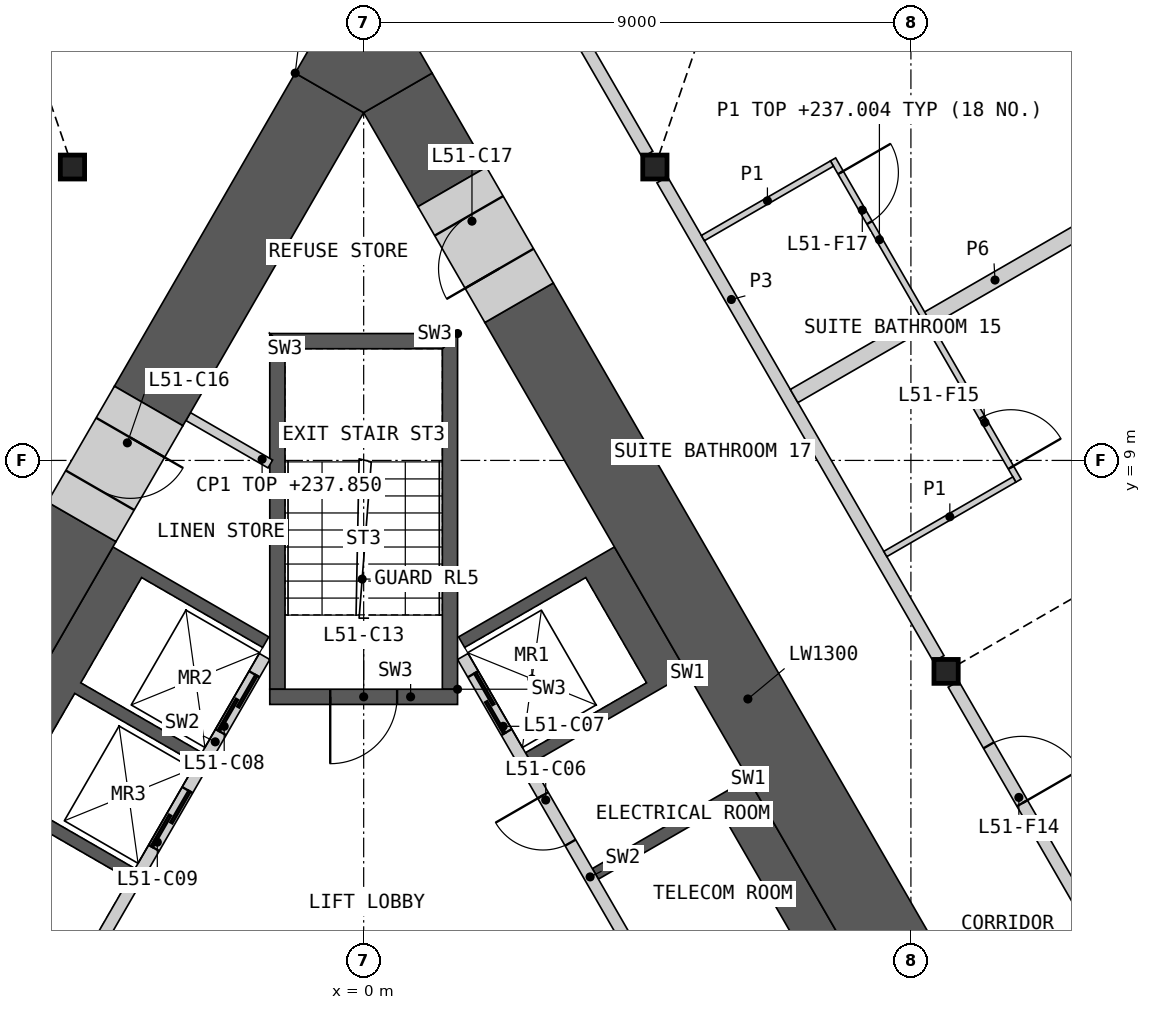
"""IFC4 building model, lengths in metres.
Left out: names, types, materials, properties, quantities, classifications, styles, units other than length and angle.
Written with IfcOpenShell. Run it as: python <this file> out.ifc"""

import sys

from ifc_helpers import new_model, si_unit, direction, frame, frame_2d, origin, origin_2d, place, context, subcontext, project, spatial, polyline, rectangle, i_section, outline, extrude, element, fill, save


model = new_model("IFC4")
c1 = context("Model", 3, precision=1e-05, world=origin(), true_north=direction((0.0, 1.0)))
c2 = subcontext(c1, "Body", "Model", "MODEL_VIEW")
j1 = project(units=[si_unit("LENGTHUNIT", "METRE"), si_unit("PLANEANGLEUNIT", "RADIAN")], contexts=[c1])
p1 = place(None, origin())
s1 = spatial("IfcSite", under=j1, at=p1, CompositionType="ELEMENT")
p2 = place(p1, origin())
s2 = spatial("IfcBuilding", under=s1, at=p2, CompositionType="ELEMENT")
p3 = place(p2, frame((0.0, 0.0, 234.6)))
s3 = spatial("IfcBuildingStorey", under=s2, at=p3, CompositionType="ELEMENT", Elevation=234.6)
for number, where, z_axis, x_axis in (
    (1, (-4.789, 13.825, 0.0), (0.0, 0.0, 1.0), (1.0, 0.0, 0.0)),
    (2, (9.578, 5.53, 0.0), (0.0, 0.0, 1.0), (1.0, 0.0, 0.0)),
    (3, (4.789, 13.825, 0.0), (0.0, 0.0, 1.0), (1.0, 0.0, 0.0)),
):
    element("IfcColumn", number, at=place(p3, frame(where, z_axis=z_axis, x_axis=x_axis)), inside=s3, PredefinedType="COLUMN", context=c2, shape_type="SweptSolid", body=[
        extrude(i_section(OverallWidth=0.399, OverallDepth=0.393, WebThickness=0.023, FlangeThickness=0.037, at=origin_2d()), origin(), (0.0, 0.0, 1.0), 3.6),
    ])
p4 = place(p3, origin())
e4 = element("IfcWall", 4, at=p4, inside=s3, PredefinedType="SHEAR", context=c2, shape_type="SweptSolid", body=[
    extrude(outline(polyline([(6.324, 3.767), (8.624, -0.217), (8.231, -0.444), (6.061, -1.697), (5.96, -1.524), (7.952, -0.374), (5.852, 3.263), (3.861, 2.113), (3.76, 2.287), (5.931, 3.54), (6.324, 3.767)])), origin(), (0.0, 0.0, 1.0), 3.25),
])
p5 = place(p3, origin())
e5 = element("IfcWall", 5, at=p5, inside=s3, PredefinedType="SHEAR", context=c2, shape_type="SweptSolid", body=[
    extrude(outline(polyline([(5.324, 5.499), (4.931, 5.272), (2.76, 4.019), (2.66, 4.192), (4.652, 5.342), (3.652, 7.074), (1.66, 5.924), (1.561, 6.097), (3.731, 7.35), (4.124, 7.577), (5.324, 5.499)])), origin(), (0.0, 0.0, 1.0), 3.25),
])
p6 = place(p3, frame((5.817, -1.476, 0.0), z_axis=(0.0, 0.0, 1.0), x_axis=(-0.500002616675, 0.866023893041, 0.0)))
e6 = element("IfcWall", 6, at=p6, inside=s3, PredefinedType="SOLIDWALL", context=c2, shape_type="SweptSolid", body=[
    extrude(rectangle(XDim=8.373, YDim=0.2, at=frame_2d((4.187, 0.0))), origin(), (0.0, 0.0, 1.0), 3.25),
])
p7 = place(p6, frame((1.537, 0.0, 0.0)))
e7 = element("IfcOpeningElement", 7, at=p7, cuts=e6, PredefinedType="OPENING", context=c2, shape_type="SweptSolid", body=[
    extrude(rectangle(XDim=0.9, YDim=2.1, at=frame_2d((0.45, 1.05))), frame((0.0, 0.11, 0.0), z_axis=(0.0, -1.0, 0.0), x_axis=(1.0, 0.0, 0.0)), (0.0, 0.0, 1.0), 0.22),
])
p8 = place(p6, frame((4.837, 0.0, 0.0)))
e8 = element("IfcOpeningElement", 8, at=p8, cuts=e6, PredefinedType="OPENING", context=c2, shape_type="SweptSolid", body=[
    extrude(rectangle(XDim=0.9, YDim=2.1, at=frame_2d((0.45, 1.05))), frame((0.0, 0.11, 0.0), z_axis=(0.0, -1.0, 0.0), x_axis=(1.0, 0.0, 0.0)), (0.0, 0.0, 1.0), 0.22),
])
p9 = place(p6, frame((6.937, 0.0, 0.0)))
e9 = element("IfcOpeningElement", 9, at=p9, cuts=e6, PredefinedType="OPENING", context=c2, shape_type="SweptSolid", body=[
    extrude(rectangle(XDim=1.1, YDim=2.1, at=frame_2d((0.55, 1.05))), frame((0.0, 0.11, 0.0), z_axis=(0.0, -1.0, 0.0), x_axis=(1.0, 0.0, 0.0)), (0.0, 0.0, 1.0), 0.22),
])
p10 = place(p3, origin())
e10 = element("IfcWall", 10, at=p10, inside=s3, PredefinedType="SHEAR", context=c2, shape_type="SweptSolid", body=[
    extrude(outline(polyline([(-7.524, 1.688), (-4.124, 7.577), (-3.731, 7.35), (-1.561, 6.097), (-1.66, 5.924), (-3.652, 7.074), (-4.652, 5.342), (-2.66, 4.192), (-2.76, 4.019), (-4.752, 5.169), (-5.752, 3.437), (-3.76, 2.287), (-3.861, 2.113), (-5.852, 3.263), (-6.852, 1.531), (-4.861, 0.381), (-4.96, 0.208), (-7.131, 1.461), (-7.524, 1.688)])), origin(), (0.0, 0.0, 1.0), 3.25),
])
p11 = place(p3, frame((-1.631, 5.776, 0.0), z_axis=(0.0, 0.0, 1.0), x_axis=(-0.499992876559, -0.866029516466, 0.0)))
e11 = element("IfcWall", 11, at=p11, inside=s3, PredefinedType="SOLIDWALL", context=c2, shape_type="SweptSolid", body=[
    extrude(rectangle(XDim=6.486, YDim=0.2, at=frame_2d((3.243, 0.0))), origin(), (0.0, 0.0, 1.0), 3.25),
])
p12 = place(p11, frame((0.337, 0.0, 0.0)))
e12 = element("IfcOpeningElement", 12, at=p12, cuts=e11, PredefinedType="OPENING", context=c2, shape_type="SweptSolid", body=[
    extrude(rectangle(XDim=1.1, YDim=2.1, at=frame_2d((0.55, 1.05))), frame((0.0, 0.11, 0.0), z_axis=(0.0, -1.0, 0.0), x_axis=(1.0, 0.0, 0.0)), (0.0, 0.0, 1.0), 0.22),
])
p13 = place(p11, frame((2.537, 0.0, 0.0)))
e13 = element("IfcOpeningElement", 13, at=p13, cuts=e11, PredefinedType="OPENING", context=c2, shape_type="SweptSolid", body=[
    extrude(rectangle(XDim=1.1, YDim=2.1, at=frame_2d((0.55, 1.05))), frame((0.0, 0.11, 0.0), z_axis=(0.0, -1.0, 0.0), x_axis=(1.0, 0.0, 0.0)), (0.0, 0.0, 1.0), 0.22),
])
p14 = place(p3, origin())
e14 = element("IfcWall", 14, at=p14, inside=s3, PredefinedType="SHEAR", context=c2, shape_type="SweptSolid", body=[
    extrude(outline(polyline([(1.544, 5.237), (1.544, 11.087), (1.294, 10.837), (1.294, 5.237), (1.544, 5.237)])), origin(), (0.0, 0.0, 1.0), 3.25),
])
p15 = place(p3, origin())
e15 = element("IfcWall", 15, at=p15, inside=s3, PredefinedType="SHEAR", context=c2, shape_type="SweptSolid", body=[
    extrude(outline(polyline([(1.544, 11.087), (-1.544, 11.087), (-1.294, 10.837), (1.294, 10.837), (1.544, 11.087)])), origin(), (0.0, 0.0, 1.0), 3.25),
])
p16 = place(p3, origin())
e16 = element("IfcWall", 16, at=p16, inside=s3, PredefinedType="SHEAR", context=c2, shape_type="SweptSolid", body=[
    extrude(outline(polyline([(-1.294, 10.837), (-1.544, 11.087), (-1.544, 5.237), (-1.294, 5.237), (-1.294, 10.837)])), origin(), (0.0, 0.0, 1.0), 3.25),
])
p17 = place(p3, frame((1.544, 5.112, 0.0), z_axis=(0.0, 0.0, 1.0), x_axis=(-1.0, 0.0, 0.0)))
e17 = element("IfcWall", 17, at=p17, inside=s3, PredefinedType="SHEAR", context=c2, shape_type="SweptSolid", body=[
    extrude(rectangle(XDim=3.088, YDim=0.25, at=frame_2d((1.544, 0.0))), origin(), (0.0, 0.0, 1.0), 3.25),
])
p18 = place(p17, frame((0.994, 0.0, 0.0)))
e18 = element("IfcOpeningElement", 18, at=p18, cuts=e17, PredefinedType="OPENING", context=c2, shape_type="SweptSolid", body=[
    extrude(rectangle(XDim=1.1, YDim=2.1, at=frame_2d((0.55, 1.05))), frame((0.0, 0.135, 0.0), z_axis=(0.0, -1.0, 0.0), x_axis=(1.0, 0.0, 0.0)), (0.0, 0.0, 1.0), 0.27),
])
p19 = place(p3, frame((-2.886, 9.721, 0.0), z_axis=(0.0, 0.0, 1.0), x_axis=(0.865990094875, -0.500061151839, 0.0)))
e19 = element("IfcWall", 19, at=p19, inside=s3, PredefinedType="PARTITIONING", context=c2, shape_type="SweptSolid", body=[
    extrude(rectangle(XDim=1.56, YDim=0.15, at=frame_2d((0.78, 0.0))), origin(), (0.0, 0.0, 1.0), 3.25),
])
p20 = place(p3, frame((10.081, -1.441, 0.0), z_axis=(0.0, 0.0, 1.0), x_axis=(-0.500012180433, 0.866018371294, 0.0)))
e20 = element("IfcWall", 20, at=p20, inside=s3, PredefinedType="SHEAR", context=c2, shape_type="SweptSolid", body=[
    extrude(rectangle(XDim=15.05, YDim=1.3, at=frame_2d((7.525, 0.0))), origin(), (0.0, 0.0, 1.0), 3.25),
])
p21 = place(p3, frame((1.456, 13.499, 0.0), z_axis=(0.0, 0.0, 1.0), x_axis=(-0.499990639951, 0.866030807744, 0.0)))
e21 = element("IfcWall", 21, at=p21, inside=s3, PredefinedType="SHEAR", context=c2, shape_type="SweptSolid", body=[
    extrude(rectangle(XDim=1.786, YDim=1.3, at=frame_2d((0.893, 0.0))), origin(), (0.0, 0.0, 1.0), 3.25),
])
p22 = place(p3, frame((-4.636, 7.99, 0.0), z_axis=(0.0, 0.0, 1.0), x_axis=(-0.500022813292, -0.866012232124, 0.0)))
e22 = element("IfcWall", 22, at=p22, inside=s3, PredefinedType="SHEAR", context=c2, shape_type="SweptSolid", body=[
    extrude(rectangle(XDim=6.802, YDim=1.3, at=frame_2d((3.401, 0.0))), origin(), (0.0, 0.0, 1.0), 3.25),
])
p23 = place(p3, frame((-0.563, 15.045, 0.0), z_axis=(0.0, 0.0, 1.0), x_axis=(-0.500011498138, -0.866018765229, 0.0)))
e23 = element("IfcWall", 23, at=p23, inside=s3, PredefinedType="SHEAR", context=c2, shape_type="SweptSolid", body=[
    extrude(rectangle(XDim=5.947, YDim=1.3, at=frame_2d((2.973, 0.0))), origin(), (0.0, 0.0, 1.0), 3.25),
])
p24 = place(p3, origin())
e24 = element("IfcWall", 24, at=p24, inside=s3, PredefinedType="SHEAR", context=c2, shape_type="SweptSolid", body=[
    extrude(outline(polyline([(-1.126, 15.371), (0.0, 17.321), (1.126, 15.371), (0.0, 14.72), (-1.126, 15.371)])), origin(), (0.0, 0.0, 1.0), 3.25),
])
p25 = place(p3, frame((-3.536, 9.896, 0.0), z_axis=(0.0, 0.0, 1.0), x_axis=(-0.499981787252, -0.866035918664, 0.0)))
e25 = element("IfcWall", 25, at=p25, inside=s3, PredefinedType="SHEAR", context=c2, shape_type="SweptSolid", body=[
    extrude(rectangle(XDim=2.2, YDim=1.3, at=frame_2d((1.1, 0.0))), origin(), (0.0, 0.0, 1.0), 3.25),
])
p26 = place(p25, frame((0.6, 0.0, 0.0)))
e26 = element("IfcOpeningElement", 26, at=p26, cuts=e25, PredefinedType="OPENING", context=c2, shape_type="SweptSolid", body=[
    extrude(rectangle(XDim=1.0, YDim=2.1, at=frame_2d((0.5, 1.05))), frame((0.0, 0.66, 0.0), z_axis=(0.0, -1.0, 0.0), x_axis=(1.0, 0.0, 0.0)), (0.0, 0.0, 1.0), 1.32),
])
p27 = place(p3, frame((2.556, 11.593, 0.0), z_axis=(0.0, 0.0, 1.0), x_axis=(-0.499946605688, 0.86605622881, 0.0)))
e27 = element("IfcWall", 27, at=p27, inside=s3, PredefinedType="SHEAR", context=c2, shape_type="SweptSolid", body=[
    extrude(rectangle(XDim=2.2, YDim=1.3, at=frame_2d((1.1, 0.0))), origin(), (0.0, 0.0, 1.0), 3.25),
])
p28 = place(p27, frame((0.65, 0.0, 0.0)))
e28 = element("IfcOpeningElement", 28, at=p28, cuts=e27, PredefinedType="OPENING", context=c2, shape_type="SweptSolid", body=[
    extrude(rectangle(XDim=1.0, YDim=2.1, at=frame_2d((0.5, 1.05))), frame((0.0, 0.66, 0.0), z_axis=(0.0, -1.0, 0.0), x_axis=(1.0, 0.0, 0.0)), (0.0, 0.0, 1.0), 1.32),
])
p29 = place(p3, frame((9.699, 5.321, 0.0), z_axis=(0.0, 0.0, 1.0), x_axis=(0.49998193945, -0.866035830797, 0.0)))
e29 = element("IfcWall", 29, at=p29, inside=s3, PredefinedType="PARTITIONING", context=c2, shape_type="SweptSolid", body=[
    extrude(rectangle(XDim=9.094, YDim=0.2, at=frame_2d((4.547, 0.0))), origin(), (0.0, 0.0, 1.0), 3.25),
])
p30 = place(p29, frame((5.212, 0.0, 0.0)))
e30 = element("IfcOpeningElement", 30, at=p30, cuts=e29, PredefinedType="OPENING", context=c2, shape_type="SweptSolid", body=[
    extrude(rectangle(XDim=1.0, YDim=2.1, at=frame_2d((0.5, 1.05))), frame((0.0, 0.11, 0.0), z_axis=(0.0, -1.0, 0.0), x_axis=(1.0, 0.0, 0.0)), (0.0, 0.0, 1.0), 0.22),
])
p31 = place(p29, frame((1.162, 0.0, 0.0)))
e31 = element("IfcOpeningElement", 31, at=p31, cuts=e29, PredefinedType="OPENING", context=c2, shape_type="SweptSolid", body=[
    extrude(rectangle(XDim=1.1, YDim=2.1, at=frame_2d((0.55, 1.05))), frame((0.0, 0.11, 0.0), z_axis=(0.0, -1.0, 0.0), x_axis=(1.0, 0.0, 0.0)), (0.0, 0.0, 1.0), 0.22),
])
p32 = place(p3, frame((4.91, 13.616, 0.0), z_axis=(0.0, 0.0, 1.0), x_axis=(0.50000207303, -0.866024206917, 0.0)))
e32 = element("IfcWall", 32, at=p32, inside=s3, PredefinedType="PARTITIONING", context=c2, shape_type="SweptSolid", body=[
    extrude(rectangle(XDim=9.095, YDim=0.2, at=frame_2d((4.547, 0.0))), origin(), (0.0, 0.0, 1.0), 3.25),
])
p33 = place(p3, frame((7.079, 10.059, 0.0), z_axis=(0.0, 0.0, 1.0), x_axis=(0.866033195618, 0.499986503906, 0.0)))
e33 = element("IfcWall", 33, at=p33, inside=s3, PredefinedType="PARTITIONING", context=c2, shape_type="SweptSolid", body=[
    extrude(rectangle(XDim=7.63, YDim=0.25, at=frame_2d((3.815, 0.0))), origin(), (0.0, 0.0, 1.0), 2.404),
])
p34 = place(p3, frame((1.913, 18.807, 0.0), z_axis=(0.0, 0.0, 1.0), x_axis=(0.499984524817, -0.866034338201, 0.0)))
e34 = element("IfcWall", 34, at=p34, inside=s3, PredefinedType="PARTITIONING", context=c2, shape_type="SweptSolid", body=[
    extrude(rectangle(XDim=5.51, YDim=0.2, at=frame_2d((2.755, 0.0))), origin(), (0.0, 0.0, 1.0), 3.25),
])
p35 = place(p34, frame((0.35, 0.0, 0.0)))
e35 = element("IfcOpeningElement", 35, at=p35, cuts=e34, PredefinedType="OPENING", context=c2, shape_type="SweptSolid", body=[
    extrude(rectangle(XDim=1.1, YDim=2.1, at=frame_2d((0.55, 1.05))), frame((0.0, 0.11, 0.0), z_axis=(0.0, -1.0, 0.0), x_axis=(1.0, 0.0, 0.0)), (0.0, 0.0, 1.0), 0.22),
])
p36 = place(p3, frame((7.719, 13.95, 0.0), z_axis=(0.0, 0.0, 1.0), x_axis=(0.500008851346, -0.866020293397, 0.0)))
e36 = element("IfcWall", 36, at=p36, inside=s3, PredefinedType="PARTITIONING", context=c2, shape_type="SweptSolid", body=[
    extrude(rectangle(XDim=6.1, YDim=0.1, at=frame_2d((3.05, 0.0))), origin(), (0.0, 0.0, 1.0), 2.404),
])
p37 = place(p36, frame((4.9, 0.0, 0.0)))
e37 = element("IfcOpeningElement", 37, at=p37, cuts=e36, PredefinedType="OPENING", context=c2, shape_type="SweptSolid", body=[
    extrude(rectangle(XDim=0.95, YDim=2.1, at=frame_2d((0.475, 1.05))), frame((0.0, 0.06, 0.0), z_axis=(0.0, -1.0, 0.0), x_axis=(1.0, 0.0, 0.0)), (0.0, 0.0, 1.0), 0.12),
])
p38 = place(p36, frame((0.25, 0.0, 0.0)))
e38 = element("IfcOpeningElement", 38, at=p38, cuts=e36, PredefinedType="OPENING", context=c2, shape_type="SweptSolid", body=[
    extrude(rectangle(XDim=0.95, YDim=2.1, at=frame_2d((0.475, 1.05))), frame((0.0, 0.06, 0.0), z_axis=(0.0, -1.0, 0.0), x_axis=(1.0, 0.0, 0.0)), (0.0, 0.0, 1.0), 0.12),
])
p39 = place(p3, frame((8.579, 7.461, 0.0), z_axis=(0.0, 0.0, 1.0), x_axis=(0.866014668023, 0.500018594424, 0.0)))
e39 = element("IfcWall", 39, at=p39, inside=s3, PredefinedType="PARTITIONING", context=c2, shape_type="SweptSolid", body=[
    extrude(rectangle(XDim=2.45, YDim=0.1, at=frame_2d((1.225, 0.0))), origin(), (0.0, 0.0, 1.0), 2.404),
])
p40 = place(p3, frame((5.579, 12.657, 0.0), z_axis=(0.0, 0.0, 1.0), x_axis=(0.866057815567, 0.499943856944, 0.0)))
e40 = element("IfcWall", 40, at=p40, inside=s3, PredefinedType="PARTITIONING", context=c2, shape_type="SweptSolid", body=[
    extrude(rectangle(XDim=2.45, YDim=0.1, at=frame_2d((1.225, 0.0))), origin(), (0.0, 0.0, 1.0), 2.404),
])
p41 = place(p8, origin())
e41 = element("IfcDoor", 41, at=p41, inside=s3, OperationType="SINGLE_SWING_RIGHT", PredefinedType="DOOR", context=c2, shape_type="SweptSolid", body=[
    extrude(rectangle(XDim=0.9, YDim=2.1, at=frame_2d((0.45, 1.05))), frame((0.0, 0.025, 0.0), z_axis=(0.0, -1.0, 0.0), x_axis=(1.0, 0.0, 0.0)), (0.0, 0.0, 1.0), 0.05),
])
fill(e8, e41)
p42 = place(p9, origin())
e42 = element("IfcDoor", 42, at=p42, inside=s3, OperationType="SLIDING_TO_LEFT", PredefinedType="DOOR", context=c2, shape_type="SweptSolid", body=[
    extrude(rectangle(XDim=1.1, YDim=2.1, at=frame_2d((0.55, 1.05))), frame((0.0, 0.025, 0.0), z_axis=(0.0, -1.0, 0.0), x_axis=(1.0, 0.0, 0.0)), (0.0, 0.0, 1.0), 0.05),
])
fill(e9, e42)
p43 = place(p12, origin())
e43 = element("IfcDoor", 43, at=p43, inside=s3, OperationType="SLIDING_TO_LEFT", PredefinedType="DOOR", context=c2, shape_type="SweptSolid", body=[
    extrude(rectangle(XDim=1.1, YDim=2.1, at=frame_2d((0.55, 1.05))), frame((0.0, 0.025, 0.0), z_axis=(0.0, -1.0, 0.0), x_axis=(1.0, 0.0, 0.0)), (0.0, 0.0, 1.0), 0.05),
])
fill(e12, e43)
p44 = place(p13, origin())
e44 = element("IfcDoor", 44, at=p44, inside=s3, OperationType="SLIDING_TO_LEFT", PredefinedType="DOOR", context=c2, shape_type="SweptSolid", body=[
    extrude(rectangle(XDim=1.1, YDim=2.1, at=frame_2d((0.55, 1.05))), frame((0.0, 0.025, 0.0), z_axis=(0.0, -1.0, 0.0), x_axis=(1.0, 0.0, 0.0)), (0.0, 0.0, 1.0), 0.05),
])
fill(e13, e44)
p45 = place(p18, origin())
e45 = element("IfcDoor", 45, at=p45, inside=s3, OperationType="SINGLE_SWING_RIGHT", PredefinedType="DOOR", context=c2, shape_type="SweptSolid", body=[
    extrude(rectangle(XDim=1.1, YDim=2.1, at=frame_2d((0.55, 1.05))), frame((0.0, 0.025, 0.0), z_axis=(0.0, -1.0, 0.0), x_axis=(1.0, 0.0, 0.0)), (0.0, 0.0, 1.0), 0.05),
])
fill(e18, e45)
p46 = place(p26, origin())
e46 = element("IfcDoor", 46, at=p46, inside=s3, OperationType="SINGLE_SWING_LEFT", PredefinedType="DOOR", context=c2, shape_type="SweptSolid", body=[
    extrude(rectangle(XDim=1.0, YDim=2.1, at=frame_2d((0.5, 1.05))), frame((0.0, 0.405, 0.0), z_axis=(0.0, -1.0, 0.0), x_axis=(1.0, 0.0, 0.0)), (0.0, 0.0, 1.0), 0.05),
])
fill(e26, e46)
p47 = place(p28, origin())
e47 = element("IfcDoor", 47, at=p47, inside=s3, OperationType="SINGLE_SWING_LEFT", PredefinedType="DOOR", context=c2, shape_type="SweptSolid", body=[
    extrude(rectangle(XDim=1.0, YDim=2.1, at=frame_2d((0.5, 1.05))), frame((0.0, 0.405, 0.0), z_axis=(0.0, -1.0, 0.0), x_axis=(1.0, 0.0, 0.0)), (0.0, 0.0, 1.0), 0.05),
])
fill(e28, e47)
p48 = place(p31, origin())
e48 = element("IfcDoor", 48, at=p48, inside=s3, OperationType="SINGLE_SWING_RIGHT", PredefinedType="DOOR", context=c2, shape_type="SweptSolid", body=[
    extrude(rectangle(XDim=1.1, YDim=2.1, at=frame_2d((0.55, 1.05))), frame((0.0, 0.025, 0.0), z_axis=(0.0, -1.0, 0.0), x_axis=(1.0, 0.0, 0.0)), (0.0, 0.0, 1.0), 0.05),
])
fill(e31, e48)
p49 = place(p37, origin())
e49 = element("IfcDoor", 49, at=p49, inside=s3, OperationType="SINGLE_SWING_RIGHT", PredefinedType="DOOR", context=c2, shape_type="SweptSolid", body=[
    extrude(rectangle(XDim=0.95, YDim=2.1, at=frame_2d((0.475, 1.05))), frame((0.0, 0.025, 0.0), z_axis=(0.0, -1.0, 0.0), x_axis=(1.0, 0.0, 0.0)), (0.0, 0.0, 1.0), 0.05),
])
fill(e37, e49)
p50 = place(p38, origin())
e50 = element("IfcDoor", 50, at=p50, inside=s3, OperationType="SINGLE_SWING_LEFT", PredefinedType="DOOR", context=c2, shape_type="SweptSolid", body=[
    extrude(rectangle(XDim=0.95, YDim=2.1, at=frame_2d((0.475, 1.05))), frame((0.0, 0.025, 0.0), z_axis=(0.0, -1.0, 0.0), x_axis=(1.0, 0.0, 0.0)), (0.0, 0.0, 1.0), 0.05),
])
fill(e38, e50)
save(model, sys.argv[1])
